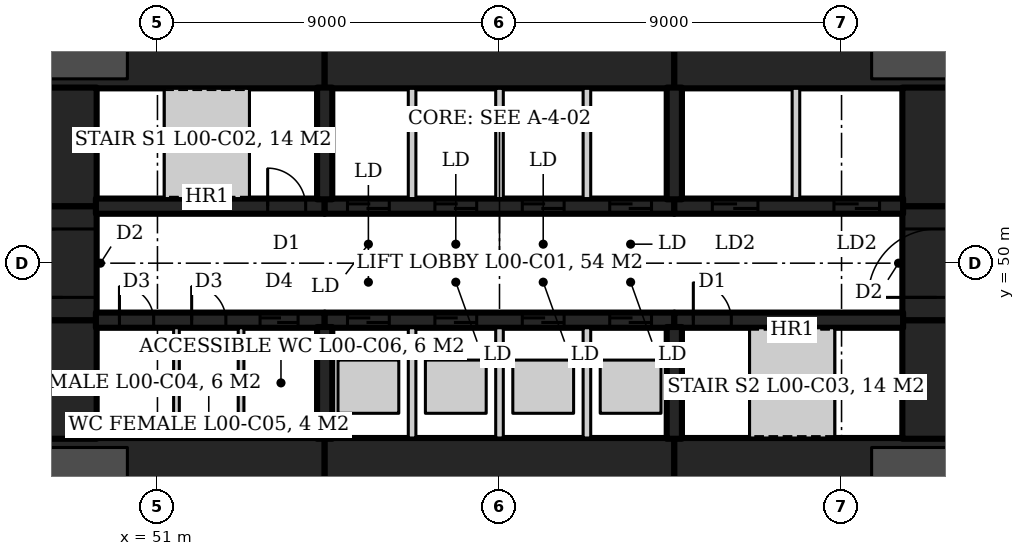
"""IFC4 building model, lengths in metres.
Left out: names, types, materials, properties, quantities, classifications, styles, units other than length and angle.
Written with IfcOpenShell. Run it as: python <this file> out.ifc"""

import sys

from ifc_helpers import new_model, si_unit, direction, frame, frame_2d, origin, origin_2d, place, context, subcontext, project, spatial, rectangle, circle, extrude, element, fill, save


model = new_model("IFC4")
c1 = context("Model", 3, precision=1e-05, world=origin(), true_north=direction((0.0, 1.0)))
c2 = subcontext(c1, "Body", "Model", "MODEL_VIEW")
j1 = project(units=[si_unit("LENGTHUNIT", "METRE"), si_unit("PLANEANGLEUNIT", "RADIAN")], contexts=[c1])
p1 = place(None, origin())
s1 = spatial("IfcSite", under=j1, at=p1, CompositionType="ELEMENT")
p2 = place(p1, origin())
s2 = spatial("IfcBuilding", under=s1, at=p2, CompositionType="ELEMENT")
p3 = place(p2, origin())
s3 = spatial("IfcBuildingStorey", under=s2, at=p3, CompositionType="ELEMENT", Elevation=0.0)
for number, where, z_axis, x_axis in (
    (1, (71.691, 56.75, 0.0), (0.0, 0.0, 1.0), (1.0, 0.0, 0.0)),
    (2, (48.309, 56.75, 0.0), (0.0, 0.0, 1.0), (1.0, 0.0, 0.0)),
    (3, (48.309, 43.25, 0.0), (0.0, 0.0, 1.0), (1.0, 0.0, 0.0)),
    (4, (71.691, 43.25, 0.0), (0.0, 0.0, 1.0), (1.0, 0.0, 0.0)),
):
    element("IfcColumn", number, at=place(p3, frame(where, z_axis=z_axis, x_axis=x_axis)), inside=s3, PredefinedType="COLUMN", context=c2, shape_type="SweptSolid", body=[
        extrude(circle(Radius=1.9, at=origin_2d()), origin(), (0.0, 0.0, 1.0), 6.0),
    ])
p4 = place(p3, frame((47.6, 55.5, 0.0), z_axis=(0.0, 0.0, 1.0), x_axis=(1.0, 0.0, 0.0)))
e5 = element("IfcWall", 5, at=p4, inside=s3, PredefinedType="SHEAR", context=c2, shape_type="SweptSolid", body=[
    extrude(rectangle(XDim=7.8, YDim=1.8, at=frame_2d((3.9, 0.0))), origin(), (0.0, 0.0, 1.0), 6.0),
])
p5 = place(p3, frame((55.4, 55.5, 0.0), z_axis=(0.0, 0.0, 1.0), x_axis=(1.0, 0.0, 0.0)))
e6 = element("IfcWall", 6, at=p5, inside=s3, PredefinedType="SHEAR", context=c2, shape_type="SweptSolid", body=[
    extrude(rectangle(XDim=9.2, YDim=1.8, at=frame_2d((4.6, 0.0))), origin(), (0.0, 0.0, 1.0), 6.0),
])
for number, where, z_axis, x_axis in (
    (7, (64.6, 55.5, 0.0), (0.0, 0.0, 1.0), (1.0, 0.0, 0.0)),
    (8, (47.6, 44.5, 0.0), (0.0, 0.0, 1.0), (1.0, 0.0, 0.0)),
):
    element("IfcWall", number, at=place(p3, frame(where, z_axis=z_axis, x_axis=x_axis)), inside=s3, PredefinedType="SHEAR", context=c2, shape_type="SweptSolid", body=[
        extrude(rectangle(XDim=7.8, YDim=1.8, at=frame_2d((3.9, 0.0))), origin(), (0.0, 0.0, 1.0), 6.0),
    ])
p6 = place(p3, frame((55.4, 44.5, 0.0), z_axis=(0.0, 0.0, 1.0), x_axis=(1.0, 0.0, 0.0)))
e9 = element("IfcWall", 9, at=p6, inside=s3, PredefinedType="SHEAR", context=c2, shape_type="SweptSolid", body=[
    extrude(rectangle(XDim=9.2, YDim=1.8, at=frame_2d((4.6, 0.0))), origin(), (0.0, 0.0, 1.0), 6.0),
])
p7 = place(p3, frame((64.6, 44.5, 0.0), z_axis=(0.0, 0.0, 1.0), x_axis=(1.0, 0.0, 0.0)))
e10 = element("IfcWall", 10, at=p7, inside=s3, PredefinedType="SHEAR", context=c2, shape_type="SweptSolid", body=[
    extrude(rectangle(XDim=7.8, YDim=1.8, at=frame_2d((3.9, 0.0))), origin(), (0.0, 0.0, 1.0), 6.0),
])
p8 = place(p3, frame((71.5, 45.38, 0.0), z_axis=(0.0, 0.0, 1.0), x_axis=(0.0, 1.0, 0.0)))
e11 = element("IfcWall", 11, at=p8, inside=s3, PredefinedType="SHEAR", context=c2, shape_type="SweptSolid", body=[
    extrude(rectangle(XDim=3.12, YDim=1.8, at=frame_2d((1.56, 0.0))), origin(), (0.0, 0.0, 1.0), 6.0),
])
p9 = place(p3, frame((71.5, 48.5, 0.0), z_axis=(0.0, 0.0, 1.0), x_axis=(0.0, 1.0, 0.0)))
e12 = element("IfcWall", 12, at=p9, inside=s3, PredefinedType="SHEAR", context=c2, shape_type="SweptSolid", body=[
    extrude(rectangle(XDim=3.0, YDim=1.8, at=frame_2d((1.5, 0.0))), origin(), (0.0, 0.0, 1.0), 6.0),
])
p10 = place(p9, frame((0.6, 0.0, 0.0)))
e13 = element("IfcOpeningElement", 13, at=p10, cuts=e12, PredefinedType="OPENING", context=c2, shape_type="SweptSolid", body=[
    extrude(rectangle(XDim=1.8, YDim=2.1, at=frame_2d((0.9, 1.05))), frame((0.0, 0.91, 0.0), z_axis=(0.0, -1.0, 0.0), x_axis=(1.0, 0.0, 0.0)), (0.0, 0.0, 1.0), 1.82),
])
for number, where, z_axis, x_axis in (
    (14, (71.5, 51.5, 0.0), (0.0, 0.0, 1.0), (0.0, 1.0, 0.0)),
    (15, (48.5, 45.38, 0.0), (0.0, 0.0, 1.0), (0.0, 1.0, 0.0)),
):
    element("IfcWall", number, at=place(p3, frame(where, z_axis=z_axis, x_axis=x_axis)), inside=s3, PredefinedType="SHEAR", context=c2, shape_type="SweptSolid", body=[
        extrude(rectangle(XDim=3.12, YDim=1.8, at=frame_2d((1.56, 0.0))), origin(), (0.0, 0.0, 1.0), 6.0),
    ])
p11 = place(p3, frame((48.5, 48.5, 0.0), z_axis=(0.0, 0.0, 1.0), x_axis=(0.0, 1.0, 0.0)))
e16 = element("IfcWall", 16, at=p11, inside=s3, PredefinedType="SHEAR", context=c2, shape_type="SweptSolid", body=[
    extrude(rectangle(XDim=3.0, YDim=1.8, at=frame_2d((1.5, 0.0))), origin(), (0.0, 0.0, 1.0), 6.0),
])
p12 = place(p11, frame((0.6, 0.0, 0.0)))
e17 = element("IfcOpeningElement", 17, at=p12, cuts=e16, PredefinedType="OPENING", context=c2, shape_type="SweptSolid", body=[
    extrude(rectangle(XDim=1.8, YDim=2.1, at=frame_2d((0.9, 1.05))), frame((0.0, 0.91, 0.0), z_axis=(0.0, -1.0, 0.0), x_axis=(1.0, 0.0, 0.0)), (0.0, 0.0, 1.0), 1.82),
])
p13 = place(p3, frame((48.5, 51.5, 0.0), z_axis=(0.0, 0.0, 1.0), x_axis=(0.0, 1.0, 0.0)))
e18 = element("IfcWall", 18, at=p13, inside=s3, PredefinedType="SHEAR", context=c2, shape_type="SweptSolid", body=[
    extrude(rectangle(XDim=3.12, YDim=1.8, at=frame_2d((1.56, 0.0))), origin(), (0.0, 0.0, 1.0), 6.0),
])
p14 = place(p3, frame((49.38, 51.5, 0.0), z_axis=(0.0, 0.0, 1.0), x_axis=(1.0, 0.0, 0.0)))
e19 = element("IfcWall", 19, at=p14, inside=s3, PredefinedType="SHEAR", context=c2, shape_type="SweptSolid", body=[
    extrude(rectangle(XDim=6.02, YDim=0.4, at=frame_2d((3.01, 0.0))), origin(), (0.0, 0.0, 1.0), 6.0),
])
p15 = place(p14, frame((4.52, 0.0, 0.0)))
e20 = element("IfcOpeningElement", 20, at=p15, cuts=e19, PredefinedType="OPENING", context=c2, shape_type="SweptSolid", body=[
    extrude(rectangle(XDim=1.0, YDim=2.1, at=frame_2d((0.5, 1.05))), frame((0.0, 0.21, 0.0), z_axis=(0.0, -1.0, 0.0), x_axis=(1.0, 0.0, 0.0)), (0.0, 0.0, 1.0), 0.42),
])
p16 = place(p3, frame((55.4, 51.5, 0.0), z_axis=(0.0, 0.0, 1.0), x_axis=(1.0, 0.0, 0.0)))
e21 = element("IfcWall", 21, at=p16, inside=s3, PredefinedType="SHEAR", context=c2, shape_type="SweptSolid", body=[
    extrude(rectangle(XDim=9.2, YDim=0.4, at=frame_2d((4.6, 0.0))), origin(), (0.0, 0.0, 1.0), 6.0),
])
p17 = place(p16, frame((0.6, 0.0, 0.0)))
e22 = element("IfcOpeningElement", 22, at=p17, cuts=e21, PredefinedType="OPENING", context=c2, shape_type="SweptSolid", body=[
    extrude(rectangle(XDim=1.1, YDim=2.1, at=frame_2d((0.55, 1.05))), frame((0.0, 0.21, 0.0), z_axis=(0.0, -1.0, 0.0), x_axis=(1.0, 0.0, 0.0)), (0.0, 0.0, 1.0), 0.42),
])
p18 = place(p16, frame((2.9, 0.0, 0.0)))
e23 = element("IfcOpeningElement", 23, at=p18, cuts=e21, PredefinedType="OPENING", context=c2, shape_type="SweptSolid", body=[
    extrude(rectangle(XDim=1.1, YDim=2.1, at=frame_2d((0.55, 1.05))), frame((0.0, 0.21, 0.0), z_axis=(0.0, -1.0, 0.0), x_axis=(1.0, 0.0, 0.0)), (0.0, 0.0, 1.0), 0.42),
])
p19 = place(p16, frame((5.2, 0.0, 0.0)))
e24 = element("IfcOpeningElement", 24, at=p19, cuts=e21, PredefinedType="OPENING", context=c2, shape_type="SweptSolid", body=[
    extrude(rectangle(XDim=1.1, YDim=2.1, at=frame_2d((0.55, 1.05))), frame((0.0, 0.21, 0.0), z_axis=(0.0, -1.0, 0.0), x_axis=(1.0, 0.0, 0.0)), (0.0, 0.0, 1.0), 0.42),
])
p20 = place(p16, frame((7.5, 0.0, 0.0)))
e25 = element("IfcOpeningElement", 25, at=p20, cuts=e21, PredefinedType="OPENING", context=c2, shape_type="SweptSolid", body=[
    extrude(rectangle(XDim=1.1, YDim=2.1, at=frame_2d((0.55, 1.05))), frame((0.0, 0.21, 0.0), z_axis=(0.0, -1.0, 0.0), x_axis=(1.0, 0.0, 0.0)), (0.0, 0.0, 1.0), 0.42),
])
p21 = place(p3, frame((64.6, 51.5, 0.0), z_axis=(0.0, 0.0, 1.0), x_axis=(1.0, 0.0, 0.0)))
e26 = element("IfcWall", 26, at=p21, inside=s3, PredefinedType="SHEAR", context=c2, shape_type="SweptSolid", body=[
    extrude(rectangle(XDim=6.02, YDim=0.4, at=frame_2d((3.01, 0.0))), origin(), (0.0, 0.0, 1.0), 6.0),
])
p22 = place(p21, frame((1.0, 0.0, 0.0)))
e27 = element("IfcOpeningElement", 27, at=p22, cuts=e26, PredefinedType="OPENING", context=c2, shape_type="SweptSolid", body=[
    extrude(rectangle(XDim=1.2, YDim=2.1, at=frame_2d((0.6, 1.05))), frame((0.0, 0.21, 0.0), z_axis=(0.0, -1.0, 0.0), x_axis=(1.0, 0.0, 0.0)), (0.0, 0.0, 1.0), 0.42),
])
p23 = place(p21, frame((4.2, 0.0, 0.0)))
e28 = element("IfcOpeningElement", 28, at=p23, cuts=e26, PredefinedType="OPENING", context=c2, shape_type="SweptSolid", body=[
    extrude(rectangle(XDim=1.2, YDim=2.1, at=frame_2d((0.6, 1.05))), frame((0.0, 0.21, 0.0), z_axis=(0.0, -1.0, 0.0), x_axis=(1.0, 0.0, 0.0)), (0.0, 0.0, 1.0), 0.42),
])
p24 = place(p3, frame((49.38, 48.5, 0.0), z_axis=(0.0, 0.0, 1.0), x_axis=(1.0, 0.0, 0.0)))
e29 = element("IfcWall", 29, at=p24, inside=s3, PredefinedType="SHEAR", context=c2, shape_type="SweptSolid", body=[
    extrude(rectangle(XDim=6.02, YDim=0.4, at=frame_2d((3.01, 0.0))), origin(), (0.0, 0.0, 1.0), 6.0),
])
p25 = place(p24, frame((0.62, 0.0, 0.0)))
e30 = element("IfcOpeningElement", 30, at=p25, cuts=e29, PredefinedType="OPENING", context=c2, shape_type="SweptSolid", body=[
    extrude(rectangle(XDim=0.9, YDim=2.1, at=frame_2d((0.45, 1.05))), frame((0.0, 0.21, 0.0), z_axis=(0.0, -1.0, 0.0), x_axis=(1.0, 0.0, 0.0)), (0.0, 0.0, 1.0), 0.42),
])
p26 = place(p24, frame((2.52, 0.0, 0.0)))
e31 = element("IfcOpeningElement", 31, at=p26, cuts=e29, PredefinedType="OPENING", context=c2, shape_type="SweptSolid", body=[
    extrude(rectangle(XDim=0.9, YDim=2.1, at=frame_2d((0.45, 1.05))), frame((0.0, 0.21, 0.0), z_axis=(0.0, -1.0, 0.0), x_axis=(1.0, 0.0, 0.0)), (0.0, 0.0, 1.0), 0.42),
])
p27 = place(p24, frame((4.32, 0.0, 0.0)))
e32 = element("IfcOpeningElement", 32, at=p27, cuts=e29, PredefinedType="OPENING", context=c2, shape_type="SweptSolid", body=[
    extrude(rectangle(XDim=1.0, YDim=2.1, at=frame_2d((0.5, 1.05))), frame((0.0, 0.21, 0.0), z_axis=(0.0, -1.0, 0.0), x_axis=(1.0, 0.0, 0.0)), (0.0, 0.0, 1.0), 0.42),
])
p28 = place(p3, frame((55.4, 48.5, 0.0), z_axis=(0.0, 0.0, 1.0), x_axis=(1.0, 0.0, 0.0)))
e33 = element("IfcWall", 33, at=p28, inside=s3, PredefinedType="SHEAR", context=c2, shape_type="SweptSolid", body=[
    extrude(rectangle(XDim=9.2, YDim=0.4, at=frame_2d((4.6, 0.0))), origin(), (0.0, 0.0, 1.0), 6.0),
])
p29 = place(p28, frame((0.6, 0.0, 0.0)))
e34 = element("IfcOpeningElement", 34, at=p29, cuts=e33, PredefinedType="OPENING", context=c2, shape_type="SweptSolid", body=[
    extrude(rectangle(XDim=1.1, YDim=2.1, at=frame_2d((0.55, 1.05))), frame((0.0, 0.21, 0.0), z_axis=(0.0, -1.0, 0.0), x_axis=(1.0, 0.0, 0.0)), (0.0, 0.0, 1.0), 0.42),
])
p30 = place(p28, frame((2.9, 0.0, 0.0)))
e35 = element("IfcOpeningElement", 35, at=p30, cuts=e33, PredefinedType="OPENING", context=c2, shape_type="SweptSolid", body=[
    extrude(rectangle(XDim=1.1, YDim=2.1, at=frame_2d((0.55, 1.05))), frame((0.0, 0.21, 0.0), z_axis=(0.0, -1.0, 0.0), x_axis=(1.0, 0.0, 0.0)), (0.0, 0.0, 1.0), 0.42),
])
p31 = place(p28, frame((5.2, 0.0, 0.0)))
e36 = element("IfcOpeningElement", 36, at=p31, cuts=e33, PredefinedType="OPENING", context=c2, shape_type="SweptSolid", body=[
    extrude(rectangle(XDim=1.1, YDim=2.1, at=frame_2d((0.55, 1.05))), frame((0.0, 0.21, 0.0), z_axis=(0.0, -1.0, 0.0), x_axis=(1.0, 0.0, 0.0)), (0.0, 0.0, 1.0), 0.42),
])
p32 = place(p28, frame((7.5, 0.0, 0.0)))
e37 = element("IfcOpeningElement", 37, at=p32, cuts=e33, PredefinedType="OPENING", context=c2, shape_type="SweptSolid", body=[
    extrude(rectangle(XDim=1.1, YDim=2.1, at=frame_2d((0.55, 1.05))), frame((0.0, 0.21, 0.0), z_axis=(0.0, -1.0, 0.0), x_axis=(1.0, 0.0, 0.0)), (0.0, 0.0, 1.0), 0.42),
])
p33 = place(p3, frame((64.6, 48.5, 0.0), z_axis=(0.0, 0.0, 1.0), x_axis=(1.0, 0.0, 0.0)))
e38 = element("IfcWall", 38, at=p33, inside=s3, PredefinedType="SHEAR", context=c2, shape_type="SweptSolid", body=[
    extrude(rectangle(XDim=6.02, YDim=0.4, at=frame_2d((3.01, 0.0))), origin(), (0.0, 0.0, 1.0), 6.0),
])
p34 = place(p33, frame((0.5, 0.0, 0.0)))
e39 = element("IfcOpeningElement", 39, at=p34, cuts=e38, PredefinedType="OPENING", context=c2, shape_type="SweptSolid", body=[
    extrude(rectangle(XDim=1.0, YDim=2.1, at=frame_2d((0.5, 1.05))), frame((0.0, 0.21, 0.0), z_axis=(0.0, -1.0, 0.0), x_axis=(1.0, 0.0, 0.0)), (0.0, 0.0, 1.0), 0.42),
])
for number, where, z_axis, x_axis in (
    (40, (55.4, 51.68, 0.0), (0.0, 0.0, 1.0), (0.0, 1.0, 0.0)),
    (41, (64.6, 51.68, 0.0), (0.0, 0.0, 1.0), (0.0, 1.0, 0.0)),
    (42, (55.4, 48.32, 0.0), (0.0, 0.0, 1.0), (0.0, -1.0, 0.0)),
    (43, (64.6, 48.32, 0.0), (0.0, 0.0, 1.0), (0.0, -1.0, 0.0)),
):
    element("IfcWall", number, at=place(p3, frame(where, z_axis=z_axis, x_axis=x_axis)), inside=s3, PredefinedType="SHEAR", context=c2, shape_type="SweptSolid", body=[
        extrude(rectangle(XDim=2.94, YDim=0.4, at=frame_2d((1.47, 0.0))), origin(), (0.0, 0.0, 1.0), 6.0),
    ])
for number, where, z_axis, x_axis in (
    (44, (57.7, 51.7, 0.0), (0.0, 0.0, 1.0), (0.0, 1.0, 0.0)),
    (45, (60.0, 51.7, 0.0), (0.0, 0.0, 1.0), (0.0, 1.0, 0.0)),
    (46, (62.3, 51.7, 0.0), (0.0, 0.0, 1.0), (0.0, 1.0, 0.0)),
    (47, (57.7, 45.4, 0.0), (0.0, 0.0, 1.0), (0.0, 1.0, 0.0)),
    (48, (60.0, 45.4, 0.0), (0.0, 0.0, 1.0), (0.0, 1.0, 0.0)),
    (49, (62.3, 45.4, 0.0), (0.0, 0.0, 1.0), (0.0, 1.0, 0.0)),
    (50, (67.8, 51.7, 0.0), (0.0, 0.0, 1.0), (0.0, 1.0, 0.0)),
):
    element("IfcWall", number, at=place(p3, frame(where, z_axis=z_axis, x_axis=x_axis)), inside=s3, PredefinedType="PARTITIONING", context=c2, shape_type="SweptSolid", body=[
        extrude(rectangle(XDim=2.9, YDim=0.2, at=frame_2d((1.45, 0.0))), origin(), (0.0, 0.0, 1.0), 6.0),
    ])
for number, where, z_axis, x_axis in (
    (51, (51.5, 45.4, 0.0), (0.0, 0.0, 1.0), (0.0, 1.0, 0.0)),
    (52, (53.2, 45.4, 0.0), (0.0, 0.0, 1.0), (0.0, 1.0, 0.0)),
):
    element("IfcWall", number, at=place(p3, frame(where, z_axis=z_axis, x_axis=x_axis)), inside=s3, PredefinedType="PARTITIONING", context=c2, shape_type="SweptSolid", body=[
        extrude(rectangle(XDim=2.9, YDim=0.15, at=frame_2d((1.45, 0.0))), origin(), (0.0, 0.0, 1.0), 5.7),
    ])
p35 = place(p15, origin())
e53 = element("IfcDoor", 53, at=p35, inside=s3, OperationType="SINGLE_SWING_LEFT", PredefinedType="DOOR", context=c2, shape_type="SweptSolid", body=[
    extrude(rectangle(XDim=1.0, YDim=2.1, at=frame_2d((0.5, 1.05))), frame((0.0, 0.025, 0.0), z_axis=(0.0, -1.0, 0.0), x_axis=(1.0, 0.0, 0.0)), (0.0, 0.0, 1.0), 0.05),
])
fill(e20, e53)
p36 = place(p34, origin())
e54 = element("IfcDoor", 54, at=p36, inside=s3, OperationType="SINGLE_SWING_LEFT", PredefinedType="DOOR", context=c2, shape_type="SweptSolid", body=[
    extrude(rectangle(XDim=1.0, YDim=2.1, at=frame_2d((0.5, 1.05))), frame((0.0, 0.025, 0.0), z_axis=(0.0, -1.0, 0.0), x_axis=(1.0, 0.0, 0.0)), (0.0, 0.0, 1.0), 0.05),
])
fill(e39, e54)
p37 = place(p22, origin())
e55 = element("IfcDoor", 55, at=p37, inside=s3, OperationType="SLIDING_TO_LEFT", PredefinedType="DOOR", context=c2, shape_type="SweptSolid", body=[
    extrude(rectangle(XDim=1.2, YDim=2.1, at=frame_2d((0.6, 1.05))), frame((0.0, 0.025, 0.0), z_axis=(0.0, -1.0, 0.0), x_axis=(1.0, 0.0, 0.0)), (0.0, 0.0, 1.0), 0.05),
])
fill(e27, e55)
p38 = place(p23, origin())
e56 = element("IfcDoor", 56, at=p38, inside=s3, OperationType="SLIDING_TO_LEFT", PredefinedType="DOOR", context=c2, shape_type="SweptSolid", body=[
    extrude(rectangle(XDim=1.2, YDim=2.1, at=frame_2d((0.6, 1.05))), frame((0.0, 0.025, 0.0), z_axis=(0.0, -1.0, 0.0), x_axis=(1.0, 0.0, 0.0)), (0.0, 0.0, 1.0), 0.05),
])
fill(e28, e56)
p39 = place(p17, origin())
e57 = element("IfcDoor", 57, at=p39, inside=s3, OperationType="SLIDING_TO_LEFT", PredefinedType="DOOR", context=c2, shape_type="SweptSolid", body=[
    extrude(rectangle(XDim=1.1, YDim=2.1, at=frame_2d((0.55, 1.05))), frame((0.0, 0.025, 0.0), z_axis=(0.0, -1.0, 0.0), x_axis=(1.0, 0.0, 0.0)), (0.0, 0.0, 1.0), 0.05),
])
fill(e22, e57)
p40 = place(p18, origin())
e58 = element("IfcDoor", 58, at=p40, inside=s3, OperationType="SLIDING_TO_LEFT", PredefinedType="DOOR", context=c2, shape_type="SweptSolid", body=[
    extrude(rectangle(XDim=1.1, YDim=2.1, at=frame_2d((0.55, 1.05))), frame((0.0, 0.025, 0.0), z_axis=(0.0, -1.0, 0.0), x_axis=(1.0, 0.0, 0.0)), (0.0, 0.0, 1.0), 0.05),
])
fill(e23, e58)
p41 = place(p19, origin())
e59 = element("IfcDoor", 59, at=p41, inside=s3, OperationType="SLIDING_TO_LEFT", PredefinedType="DOOR", context=c2, shape_type="SweptSolid", body=[
    extrude(rectangle(XDim=1.1, YDim=2.1, at=frame_2d((0.55, 1.05))), frame((0.0, 0.025, 0.0), z_axis=(0.0, -1.0, 0.0), x_axis=(1.0, 0.0, 0.0)), (0.0, 0.0, 1.0), 0.05),
])
fill(e24, e59)
p42 = place(p20, origin())
e60 = element("IfcDoor", 60, at=p42, inside=s3, OperationType="SLIDING_TO_LEFT", PredefinedType="DOOR", context=c2, shape_type="SweptSolid", body=[
    extrude(rectangle(XDim=1.1, YDim=2.1, at=frame_2d((0.55, 1.05))), frame((0.0, 0.025, 0.0), z_axis=(0.0, -1.0, 0.0), x_axis=(1.0, 0.0, 0.0)), (0.0, 0.0, 1.0), 0.05),
])
fill(e25, e60)
p43 = place(p29, origin())
e61 = element("IfcDoor", 61, at=p43, inside=s3, OperationType="SLIDING_TO_LEFT", PredefinedType="DOOR", context=c2, shape_type="SweptSolid", body=[
    extrude(rectangle(XDim=1.1, YDim=2.1, at=frame_2d((0.55, 1.05))), frame((0.0, 0.025, 0.0), z_axis=(0.0, -1.0, 0.0), x_axis=(1.0, 0.0, 0.0)), (0.0, 0.0, 1.0), 0.05),
])
fill(e34, e61)
p44 = place(p30, origin())
e62 = element("IfcDoor", 62, at=p44, inside=s3, OperationType="SLIDING_TO_LEFT", PredefinedType="DOOR", context=c2, shape_type="SweptSolid", body=[
    extrude(rectangle(XDim=1.1, YDim=2.1, at=frame_2d((0.55, 1.05))), frame((0.0, 0.025, 0.0), z_axis=(0.0, -1.0, 0.0), x_axis=(1.0, 0.0, 0.0)), (0.0, 0.0, 1.0), 0.05),
])
fill(e35, e62)
p45 = place(p31, origin())
e63 = element("IfcDoor", 63, at=p45, inside=s3, OperationType="SLIDING_TO_LEFT", PredefinedType="DOOR", context=c2, shape_type="SweptSolid", body=[
    extrude(rectangle(XDim=1.1, YDim=2.1, at=frame_2d((0.55, 1.05))), frame((0.0, 0.025, 0.0), z_axis=(0.0, -1.0, 0.0), x_axis=(1.0, 0.0, 0.0)), (0.0, 0.0, 1.0), 0.05),
])
fill(e36, e63)
p46 = place(p32, origin())
e64 = element("IfcDoor", 64, at=p46, inside=s3, OperationType="SLIDING_TO_LEFT", PredefinedType="DOOR", context=c2, shape_type="SweptSolid", body=[
    extrude(rectangle(XDim=1.1, YDim=2.1, at=frame_2d((0.55, 1.05))), frame((0.0, 0.025, 0.0), z_axis=(0.0, -1.0, 0.0), x_axis=(1.0, 0.0, 0.0)), (0.0, 0.0, 1.0), 0.05),
])
fill(e37, e64)
p47 = place(p25, origin())
e65 = element("IfcDoor", 65, at=p47, inside=s3, OperationType="SINGLE_SWING_RIGHT", PredefinedType="DOOR", context=c2, shape_type="SweptSolid", body=[
    extrude(rectangle(XDim=0.9, YDim=2.1, at=frame_2d((0.45, 1.05))), frame((0.0, 0.025, 0.0), z_axis=(0.0, -1.0, 0.0), x_axis=(1.0, 0.0, 0.0)), (0.0, 0.0, 1.0), 0.05),
])
fill(e30, e65)
p48 = place(p26, origin())
e66 = element("IfcDoor", 66, at=p48, inside=s3, OperationType="SINGLE_SWING_RIGHT", PredefinedType="DOOR", context=c2, shape_type="SweptSolid", body=[
    extrude(rectangle(XDim=0.9, YDim=2.1, at=frame_2d((0.45, 1.05))), frame((0.0, 0.025, 0.0), z_axis=(0.0, -1.0, 0.0), x_axis=(1.0, 0.0, 0.0)), (0.0, 0.0, 1.0), 0.05),
])
fill(e31, e66)
p49 = place(p27, origin())
e67 = element("IfcDoor", 67, at=p49, inside=s3, OperationType="SLIDING_TO_LEFT", PredefinedType="DOOR", context=c2, shape_type="SweptSolid", body=[
    extrude(rectangle(XDim=1.0, YDim=2.1, at=frame_2d((0.5, 1.05))), frame((0.0, 0.025, 0.0), z_axis=(0.0, -1.0, 0.0), x_axis=(1.0, 0.0, 0.0)), (0.0, 0.0, 1.0), 0.05),
])
fill(e32, e67)
p50 = place(p10, origin())
e68 = element("IfcDoor", 68, at=p50, inside=s3, OperationType="DOUBLE_DOOR_DOUBLE_SWING", PredefinedType="DOOR", context=c2, shape_type="SweptSolid", body=[
    extrude(rectangle(XDim=1.8, YDim=2.1, at=frame_2d((0.9, 1.05))), frame((0.0, 0.025, 0.0), z_axis=(0.0, -1.0, 0.0), x_axis=(1.0, 0.0, 0.0)), (0.0, 0.0, 1.0), 0.05),
])
fill(e13, e68)
p51 = place(p12, origin())
e69 = element("IfcDoor", 69, at=p51, inside=s3, OperationType="DOUBLE_DOOR_DOUBLE_SWING", PredefinedType="DOOR", context=c2, shape_type="SweptSolid", body=[
    extrude(rectangle(XDim=1.8, YDim=2.1, at=frame_2d((0.9, 1.05))), frame((0.0, 0.025, 0.0), z_axis=(0.0, -1.0, 0.0), x_axis=(1.0, 0.0, 0.0)), (0.0, 0.0, 1.0), 0.05),
])
fill(e17, e69)
save(model, sys.argv[1])
